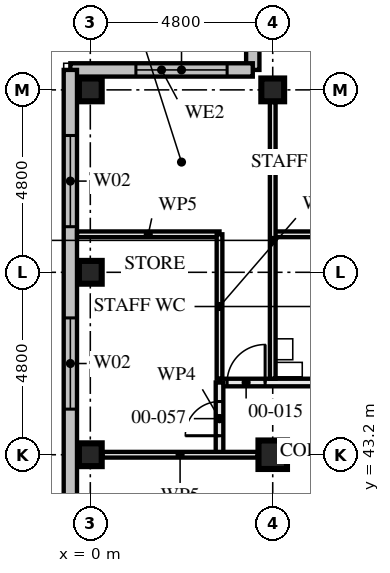
"""IFC4 building model, lengths in metres.
Left out: names, types, materials, properties, quantities, classifications, styles, units other than length and angle.
Written with IfcOpenShell. Run it as: python <this file> out.ifc"""

import sys

from ifc_helpers import new_model, si_unit, direction, frame, frame_2d, origin, origin_2d, place, context, subcontext, project, spatial, rectangle, hollow_rectangle, extrude, element, fill, save


model = new_model("IFC4")
c1 = context("Model", 3, precision=1e-05, world=origin(), true_north=direction((0.0, 1.0)))
c2 = subcontext(c1, "Body", "Model", "MODEL_VIEW")
j1 = project(units=[si_unit("LENGTHUNIT", "METRE"), si_unit("PLANEANGLEUNIT", "RADIAN")], contexts=[c1])
p1 = place(None, origin())
s1 = spatial("IfcSite", under=j1, at=p1, CompositionType="ELEMENT")
p2 = place(p1, origin())
s2 = spatial("IfcBuilding", under=s1, at=p2, CompositionType="ELEMENT")
p3 = place(p2, origin())
s3 = spatial("IfcBuildingStorey", under=s2, at=p3, CompositionType="ELEMENT", Elevation=0.0)
for number, where, z_axis, x_axis in (
    (1, (0.0, 43.2, 0.0), (0.0, 0.0, 1.0), (0.0, 1.0, 0.0)),
    (2, (0.0, 48.0, 0.0), (0.0, 0.0, 1.0), (1.0, 0.0, 0.0)),
    (3, (0.0, 52.8, 0.0), (0.0, 0.0, 1.0), (0.0, 1.0, 0.0)),
):
    element("IfcColumn", number, at=place(p3, frame(where, z_axis=z_axis, x_axis=x_axis)), inside=s3, PredefinedType="COLUMN", context=c2, shape_type="SweptSolid", body=[
        extrude(hollow_rectangle(XDim=0.6, YDim=0.6, WallThickness=0.08, at=origin_2d()), origin(), (0.0, 0.0, 1.0), 4.5),
    ])
p4 = place(p3, frame((4.8, 43.2, 0.0), z_axis=(0.0, 0.0, 1.0), x_axis=(0.0, 1.0, 0.0)))
e4 = element("IfcColumn", 4, at=p4, inside=s3, PredefinedType="COLUMN", context=c2, shape_type="SweptSolid", body=[
    extrude(hollow_rectangle(XDim=0.75, YDim=0.75, WallThickness=0.08, at=origin_2d()), origin(), (0.0, 0.0, 1.0), 4.5),
])
p5 = place(p3, frame((4.8, 52.8, 0.0), z_axis=(0.0, 0.0, 1.0), x_axis=(0.0, 1.0, 0.0)))
e5 = element("IfcColumn", 5, at=p5, inside=s3, PredefinedType="COLUMN", context=c2, shape_type="SweptSolid", body=[
    extrude(hollow_rectangle(XDim=0.6, YDim=0.6, WallThickness=0.08, at=origin_2d()), origin(), (0.0, 0.0, 1.0), 4.5),
])
p6 = place(p3, frame((4.275, 58.125, 0.0), z_axis=(0.0, 0.0, 1.0), x_axis=(0.0, -1.0, 0.0)))
e6 = element("IfcWall", 6, at=p6, inside=s3, PredefinedType="SOLIDWALL", context=c2, shape_type="SweptSolid", body=[
    extrude(rectangle(XDim=4.8, YDim=0.35, at=frame_2d((2.4, 0.0))), origin(), (0.0, 0.0, 1.0), 4.5),
])
p7 = place(p6, frame((1.725, 0.0, 0.9)))
e7 = element("IfcOpeningElement", 7, at=p7, cuts=e6, PredefinedType="OPENING", context=c2, shape_type="SweptSolid", body=[
    extrude(rectangle(XDim=2.4, YDim=2.4, at=frame_2d((1.2, 1.2))), frame((0.0, 0.186, 0.0), z_axis=(0.0, -1.0, 0.0), x_axis=(1.0, 0.0, 0.0)), (0.0, 0.0, 1.0), 0.371),
])
p8 = place(p3, frame((4.275, 53.325, 0.0), z_axis=(0.0, 0.0, 1.0), x_axis=(-1.0, 0.0, 0.0)))
e8 = element("IfcWall", 8, at=p8, inside=s3, PredefinedType="SOLIDWALL", context=c2, shape_type="SweptSolid", body=[
    extrude(rectangle(XDim=4.8, YDim=0.35, at=frame_2d((2.4, 0.0))), origin(), (0.0, 0.0, 1.0), 4.5),
])
p9 = place(p8, frame((0.675, 0.0, 0.9)))
e9 = element("IfcOpeningElement", 9, at=p9, cuts=e8, PredefinedType="OPENING", context=c2, shape_type="SweptSolid", body=[
    extrude(rectangle(XDim=2.4, YDim=2.4, at=frame_2d((1.2, 1.2))), frame((0.0, 0.186, 0.0), z_axis=(0.0, -1.0, 0.0), x_axis=(1.0, 0.0, 0.0)), (0.0, 0.0, 1.0), 0.371),
])
p10 = place(p3, frame((-0.525, 53.325, 0.0), z_axis=(0.0, 0.0, 1.0), x_axis=(0.0, -1.0, 0.0)))
e10 = element("IfcWall", 10, at=p10, inside=s3, PredefinedType="SOLIDWALL", context=c2, shape_type="SweptSolid", body=[
    extrude(rectangle(XDim=38.4, YDim=0.35, at=frame_2d((19.2, 0.0))), origin(), (0.0, 0.0, 1.0), 4.5),
])
p11 = place(p10, frame((11.925, 0.0, 0.0)))
e11 = element("IfcOpeningElement", 11, at=p11, cuts=e10, PredefinedType="OPENING", context=c2, shape_type="SweptSolid", body=[
    extrude(rectangle(XDim=1.2, YDim=2.4, at=frame_2d((0.6, 1.2))), frame((0.0, 0.186, 0.0), z_axis=(0.0, -1.0, 0.0), x_axis=(1.0, 0.0, 0.0)), (0.0, 0.0, 1.0), 0.371),
])
p12 = place(p10, frame((24.825, 0.0, 0.0)))
e12 = element("IfcOpeningElement", 12, at=p12, cuts=e10, PredefinedType="OPENING", context=c2, shape_type="SweptSolid", body=[
    extrude(rectangle(XDim=1.2, YDim=2.4, at=frame_2d((0.6, 1.2))), frame((0.0, 0.186, 0.0), z_axis=(0.0, -1.0, 0.0), x_axis=(1.0, 0.0, 0.0)), (0.0, 0.0, 1.0), 0.371),
])
p13 = place(p10, frame((35.325, 0.0, 0.9)))
e13 = element("IfcOpeningElement", 13, at=p13, cuts=e10, PredefinedType="OPENING", context=c2, shape_type="SweptSolid", body=[
    extrude(rectangle(XDim=2.4, YDim=2.4, at=frame_2d((1.2, 1.2))), frame((0.0, 0.186, 0.0), z_axis=(0.0, -1.0, 0.0), x_axis=(1.0, 0.0, 0.0)), (0.0, 0.0, 1.0), 0.371),
])
p14 = place(p10, frame((30.525, 0.0, 0.9)))
e14 = element("IfcOpeningElement", 14, at=p14, cuts=e10, PredefinedType="OPENING", context=c2, shape_type="SweptSolid", body=[
    extrude(rectangle(XDim=2.4, YDim=2.4, at=frame_2d((1.2, 1.2))), frame((0.0, 0.186, 0.0), z_axis=(0.0, -1.0, 0.0), x_axis=(1.0, 0.0, 0.0)), (0.0, 0.0, 1.0), 0.371),
])
p15 = place(p10, frame((20.925, 0.0, 0.9)))
e15 = element("IfcOpeningElement", 15, at=p15, cuts=e10, PredefinedType="OPENING", context=c2, shape_type="SweptSolid", body=[
    extrude(rectangle(XDim=2.4, YDim=2.4, at=frame_2d((1.2, 1.2))), frame((0.0, 0.186, 0.0), z_axis=(0.0, -1.0, 0.0), x_axis=(1.0, 0.0, 0.0)), (0.0, 0.0, 1.0), 0.371),
])
p16 = place(p10, frame((16.125, 0.0, 0.9)))
e16 = element("IfcOpeningElement", 16, at=p16, cuts=e10, PredefinedType="OPENING", context=c2, shape_type="SweptSolid", body=[
    extrude(rectangle(XDim=2.4, YDim=2.4, at=frame_2d((1.2, 1.2))), frame((0.0, 0.186, 0.0), z_axis=(0.0, -1.0, 0.0), x_axis=(1.0, 0.0, 0.0)), (0.0, 0.0, 1.0), 0.371),
])
p17 = place(p10, frame((6.525, 0.0, 0.9)))
e17 = element("IfcOpeningElement", 17, at=p17, cuts=e10, PredefinedType="OPENING", context=c2, shape_type="SweptSolid", body=[
    extrude(rectangle(XDim=2.4, YDim=2.4, at=frame_2d((1.2, 1.2))), frame((0.0, 0.186, 0.0), z_axis=(0.0, -1.0, 0.0), x_axis=(1.0, 0.0, 0.0)), (0.0, 0.0, 1.0), 0.371),
])
p18 = place(p10, frame((1.725, 0.0, 0.9)))
e18 = element("IfcOpeningElement", 18, at=p18, cuts=e10, PredefinedType="OPENING", context=c2, shape_type="SweptSolid", body=[
    extrude(rectangle(XDim=2.4, YDim=2.4, at=frame_2d((1.2, 1.2))), frame((0.0, 0.186, 0.0), z_axis=(0.0, -1.0, 0.0), x_axis=(1.0, 0.0, 0.0)), (0.0, 0.0, 1.0), 0.371),
])
p19 = place(p3, frame((8.2, 49.0, 0.0), z_axis=(0.0, 0.0, 1.0), x_axis=(-1.0, 0.0, 0.0)))
e19 = element("IfcWall", 19, at=p19, inside=s3, PredefinedType="PARTITIONING", context=c2, shape_type="SweptSolid", body=[
    extrude(rectangle(XDim=3.4, YDim=0.15, at=frame_2d((1.7, 0.0))), origin(), (0.0, 0.0, 1.0), 4.33),
])
p20 = place(p3, frame((3.4, 49.0, 0.0), z_axis=(0.0, 0.0, 1.0), x_axis=(0.0, -1.0, 0.0)))
e20 = element("IfcWall", 20, at=p20, inside=s3, PredefinedType="PARTITIONING", context=c2, shape_type="SweptSolid", body=[
    extrude(rectangle(XDim=3.8, YDim=0.15, at=frame_2d((1.9, 0.0))), origin(), (0.0, 0.0, 1.0), 3.55),
])
p21 = place(p3, frame((3.4, 49.0, 0.0), z_axis=(0.0, 0.0, 1.0), x_axis=(-1.0, 0.0, 0.0)))
e21 = element("IfcWall", 21, at=p21, inside=s3, PredefinedType="PARTITIONING", context=c2, shape_type="SweptSolid", body=[
    extrude(rectangle(XDim=3.75, YDim=0.15, at=frame_2d((1.875, 0.0))), origin(), (0.0, 0.0, 1.0), 3.32),
])
p22 = place(p3, frame((4.8, 52.48, 0.0), z_axis=(0.0, 0.0, 1.0), x_axis=(0.0, -1.0, 0.0)))
e22 = element("IfcWall", 22, at=p22, inside=s3, PredefinedType="PARTITIONING", context=c2, shape_type="SweptSolid", body=[
    extrude(rectangle(XDim=7.28, YDim=0.15, at=frame_2d((3.64, 0.0))), origin(), (0.0, 0.0, 1.0), 3.55),
])
p23 = place(p3, frame((14.4, 45.1, 0.0), z_axis=(0.0, 0.0, 1.0), x_axis=(-1.0, 0.0, 0.0)))
e23 = element("IfcWall", 23, at=p23, inside=s3, PredefinedType="PARTITIONING", context=c2, shape_type="SweptSolid", body=[
    extrude(rectangle(XDim=11.0, YDim=0.2, at=frame_2d((5.5, 0.0))), origin(), (0.0, 0.0, 1.0), 4.33),
])
p24 = place(p23, frame((0.2, 0.0, 0.0)))
e24 = element("IfcOpeningElement", 24, at=p24, cuts=e23, PredefinedType="OPENING", context=c2, shape_type="SweptSolid", body=[
    extrude(rectangle(XDim=1.0, YDim=2.4, at=frame_2d((0.5, 1.2))), frame((0.0, 0.111, 0.0), z_axis=(0.0, -1.0, 0.0), x_axis=(1.0, 0.0, 0.0)), (0.0, 0.0, 1.0), 0.221),
])
p25 = place(p23, frame((5.0, 0.0, 0.0)))
e25 = element("IfcOpeningElement", 25, at=p25, cuts=e23, PredefinedType="OPENING", context=c2, shape_type="SweptSolid", body=[
    extrude(rectangle(XDim=1.0, YDim=2.4, at=frame_2d((0.5, 1.2))), frame((0.0, 0.111, 0.0), z_axis=(0.0, -1.0, 0.0), x_axis=(1.0, 0.0, 0.0)), (0.0, 0.0, 1.0), 0.221),
])
p26 = place(p23, frame((9.8, 0.0, 0.0)))
e26 = element("IfcOpeningElement", 26, at=p26, cuts=e23, PredefinedType="OPENING", context=c2, shape_type="SweptSolid", body=[
    extrude(rectangle(XDim=1.0, YDim=2.4, at=frame_2d((0.5, 1.2))), frame((0.0, 0.111, 0.0), z_axis=(0.0, -1.0, 0.0), x_axis=(1.0, 0.0, 0.0)), (0.0, 0.0, 1.0), 0.221),
])
p27 = place(p23, frame((2.65, 0.0, 0.0)))
e27 = element("IfcOpeningElement", 27, at=p27, cuts=e23, PredefinedType="OPENING", context=c2, shape_type="SweptSolid", body=[
    extrude(rectangle(XDim=0.9, YDim=2.1, at=frame_2d((0.45, 1.05))), frame((0.0, 0.111, 0.0), z_axis=(0.0, -1.0, 0.0), x_axis=(1.0, 0.0, 0.0)), (0.0, 0.0, 1.0), 0.221),
])
p28 = place(p23, frame((7.4, 0.0, 0.0)))
e28 = element("IfcOpeningElement", 28, at=p28, cuts=e23, PredefinedType="OPENING", context=c2, shape_type="SweptSolid", body=[
    extrude(rectangle(XDim=1.0, YDim=2.1, at=frame_2d((0.5, 1.05))), frame((0.0, 0.111, 0.0), z_axis=(0.0, -1.0, 0.0), x_axis=(1.0, 0.0, 0.0)), (0.0, 0.0, 1.0), 0.221),
])
p29 = place(p3, frame((9.205, 43.2, 0.0), z_axis=(0.0, 0.0, 1.0), x_axis=(-1.0, 0.0, 0.0)))
e29 = element("IfcWall", 29, at=p29, inside=s3, PredefinedType="PARTITIONING", context=c2, shape_type="SweptSolid", body=[
    extrude(rectangle(XDim=4.01, YDim=0.15, at=frame_2d((2.005, 0.0))), origin(), (0.0, 0.0, 1.0), 3.32),
])
p30 = place(p3, frame((4.405, 43.2, 0.0), z_axis=(0.0, 0.0, 1.0), x_axis=(-1.0, 0.0, 0.0)))
e30 = element("IfcWall", 30, at=p30, inside=s3, PredefinedType="PARTITIONING", context=c2, shape_type="SweptSolid", body=[
    extrude(rectangle(XDim=4.085, YDim=0.15, at=frame_2d((2.042, 0.0))), origin(), (0.0, 0.0, 1.0), 3.32),
])
p31 = place(p3, frame((3.4, 45.1, 0.0), z_axis=(0.0, 0.0, 1.0), x_axis=(0.0, -1.0, 0.0)))
e31 = element("IfcWall", 31, at=p31, inside=s3, PredefinedType="PARTITIONING", context=c2, shape_type="SweptSolid", body=[
    extrude(rectangle(XDim=1.9, YDim=0.2, at=frame_2d((0.95, 0.0))), origin(), (0.0, 0.0, 1.0), 4.33),
])
p32 = place(p31, frame((0.5, 0.0, 0.0)))
e32 = element("IfcOpeningElement", 32, at=p32, cuts=e31, PredefinedType="OPENING", context=c2, shape_type="SweptSolid", body=[
    extrude(rectangle(XDim=0.9, YDim=2.1, at=frame_2d((0.45, 1.05))), frame((0.0, 0.111, 0.0), z_axis=(0.0, -1.0, 0.0), x_axis=(1.0, 0.0, 0.0)), (0.0, 0.0, 1.0), 0.221),
])
p33 = place(p9, origin())
e33 = element("IfcWindow", 33, at=p33, inside=s3, PartitioningType="SINGLE_PANEL", PredefinedType="WINDOW", context=c2, shape_type="SweptSolid", body=[
    extrude(rectangle(XDim=2.4, YDim=2.4, at=frame_2d((1.2, 1.2))), frame((0.0, 0.03, 0.0), z_axis=(0.0, -1.0, 0.0), x_axis=(1.0, 0.0, 0.0)), (0.0, 0.0, 1.0), 0.06),
])
fill(e9, e33)
p34 = place(p17, origin())
e34 = element("IfcWindow", 34, at=p34, inside=s3, PartitioningType="SINGLE_PANEL", PredefinedType="WINDOW", context=c2, shape_type="SweptSolid", body=[
    extrude(rectangle(XDim=2.4, YDim=2.4, at=frame_2d((1.2, 1.2))), frame((0.0, 0.03, 0.0), z_axis=(0.0, -1.0, 0.0), x_axis=(1.0, 0.0, 0.0)), (0.0, 0.0, 1.0), 0.06),
])
fill(e17, e34)
p35 = place(p18, origin())
e35 = element("IfcWindow", 35, at=p35, inside=s3, PartitioningType="SINGLE_PANEL", PredefinedType="WINDOW", context=c2, shape_type="SweptSolid", body=[
    extrude(rectangle(XDim=2.4, YDim=2.4, at=frame_2d((1.2, 1.2))), frame((0.0, 0.03, 0.0), z_axis=(0.0, -1.0, 0.0), x_axis=(1.0, 0.0, 0.0)), (0.0, 0.0, 1.0), 0.06),
])
fill(e18, e35)
p36 = place(p26, frame((1.0, 0.0, 0.0), z_axis=(0.0, 0.0, 1.0), x_axis=(-1.0, 0.0, 0.0)))
e36 = element("IfcDoor", 36, at=p36, inside=s3, OperationType="SINGLE_SWING_LEFT", PredefinedType="DOOR", context=c2, shape_type="SweptSolid", body=[
    extrude(rectangle(XDim=1.0, YDim=2.4, at=frame_2d((0.5, 1.2))), frame((0.0, 0.027, 0.0), z_axis=(0.0, -1.0, 0.0), x_axis=(1.0, 0.0, 0.0)), (0.0, 0.0, 1.0), 0.054),
])
fill(e26, e36)
p37 = place(p32, frame((0.9, 0.0, 0.0), z_axis=(0.0, 0.0, 1.0), x_axis=(-1.0, 0.0, 0.0)))
e37 = element("IfcDoor", 37, at=p37, inside=s3, OperationType="SINGLE_SWING_RIGHT", PredefinedType="DOOR", context=c2, shape_type="SweptSolid", body=[
    extrude(rectangle(XDim=0.9, YDim=2.1, at=frame_2d((0.45, 1.05))), frame((0.0, 0.027, 0.0), z_axis=(0.0, -1.0, 0.0), x_axis=(1.0, 0.0, 0.0)), (0.0, 0.0, 1.0), 0.054),
])
fill(e32, e37)
save(model, sys.argv[1])
